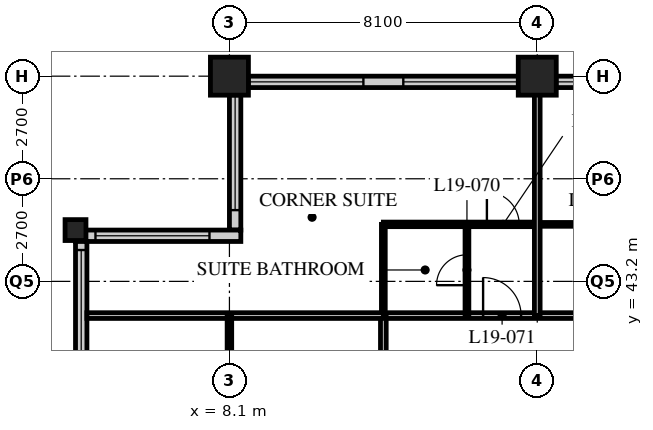
"""IFC4 building model, lengths in metres.
Left out: names, types, materials, properties, quantities, classifications, styles, units other than length and angle.
Written with IfcOpenShell. Run it as: python <this file> out.ifc"""

import sys

from ifc_helpers import new_model, si_unit, direction, frame, frame_2d, origin, origin_2d, place, context, subcontext, project, spatial, rectangle, hollow_rectangle, extrude, element, fill, save


model = new_model("IFC4")
c1 = context("Model", 3, precision=1e-05, world=origin(), true_north=direction((0.0, 1.0)))
c2 = subcontext(c1, "Body", "Model", "MODEL_VIEW")
j1 = project(units=[si_unit("LENGTHUNIT", "METRE"), si_unit("PLANEANGLEUNIT", "RADIAN")], contexts=[c1])
p1 = place(None, origin())
s1 = spatial("IfcSite", under=j1, at=p1, CompositionType="ELEMENT")
p2 = place(p1, origin())
s2 = spatial("IfcBuilding", under=s1, at=p2, CompositionType="ELEMENT")
p3 = place(p2, frame((0.0, 0.0, 77.2)))
s3 = spatial("IfcBuildingStorey", under=s2, at=p3, CompositionType="ELEMENT", Elevation=77.2)
p4 = place(p3, frame((4.05, 44.55, 0.0), z_axis=(0.0, 0.0, 1.0), x_axis=(1.0, 0.0, 0.0)))
e1 = element("IfcColumn", 1, at=p4, inside=s3, PredefinedType="COLUMN", context=c2, shape_type="SweptSolid", body=[
    extrude(hollow_rectangle(XDim=0.55, YDim=0.55, WallThickness=0.05, at=origin_2d()), origin(), (0.0, 0.0, 1.0), 3.4),
])
for number, where, z_axis, x_axis in (
    (2, (8.1, 48.6, 0.0), (0.0, 0.0, 1.0), (1.0, 0.0, 0.0)),
    (3, (16.2, 48.6, 0.0), (0.0, 0.0, 1.0), (1.0, 0.0, 0.0)),
):
    element("IfcColumn", number, at=place(p3, frame(where, z_axis=z_axis, x_axis=x_axis)), inside=s3, PredefinedType="COLUMN", context=c2, shape_type="SweptSolid", body=[
        extrude(hollow_rectangle(XDim=1.0, YDim=1.0, WallThickness=0.1, at=origin_2d()), origin(), (0.0, 0.0, 1.0), 3.4),
    ])
p5 = place(p3, frame((48.3, 48.45, 0.0), z_axis=(0.0, 0.0, 1.0), x_axis=(-1.0, 0.0, 0.0)))
e4 = element("IfcWall", 4, at=p5, inside=s3, PredefinedType="SOLIDWALL", context=c2, shape_type="SweptSolid", body=[
    extrude(rectangle(XDim=40.2, YDim=0.3, at=frame_2d((20.1, 0.0))), origin(), (0.0, 0.0, 1.0), 3.19),
])
p6 = place(p5, frame((0.225, 0.0, 0.9)))
e5 = element("IfcOpeningElement", 5, at=p6, cuts=e4, PredefinedType="OPENING", context=c2, shape_type="SweptSolid", body=[
    extrude(rectangle(XDim=3.0, YDim=1.5, at=frame_2d((1.5, 0.75))), frame((0.0, 0.16, 0.0), z_axis=(0.0, -1.0, 0.0), x_axis=(1.0, 0.0, 0.0)), (0.0, 0.0, 1.0), 0.32),
])
p7 = place(p5, frame((4.275, 0.0, 0.9)))
e6 = element("IfcOpeningElement", 6, at=p7, cuts=e4, PredefinedType="OPENING", context=c2, shape_type="SweptSolid", body=[
    extrude(rectangle(XDim=3.0, YDim=1.5, at=frame_2d((1.5, 0.75))), frame((0.0, 0.16, 0.0), z_axis=(0.0, -1.0, 0.0), x_axis=(1.0, 0.0, 0.0)), (0.0, 0.0, 1.0), 0.32),
])
p8 = place(p5, frame((8.325, 0.0, 0.9)))
e7 = element("IfcOpeningElement", 7, at=p8, cuts=e4, PredefinedType="OPENING", context=c2, shape_type="SweptSolid", body=[
    extrude(rectangle(XDim=3.0, YDim=1.5, at=frame_2d((1.5, 0.75))), frame((0.0, 0.16, 0.0), z_axis=(0.0, -1.0, 0.0), x_axis=(1.0, 0.0, 0.0)), (0.0, 0.0, 1.0), 0.32),
])
p9 = place(p5, frame((12.375, 0.0, 0.9)))
e8 = element("IfcOpeningElement", 8, at=p9, cuts=e4, PredefinedType="OPENING", context=c2, shape_type="SweptSolid", body=[
    extrude(rectangle(XDim=3.0, YDim=1.5, at=frame_2d((1.5, 0.75))), frame((0.0, 0.16, 0.0), z_axis=(0.0, -1.0, 0.0), x_axis=(1.0, 0.0, 0.0)), (0.0, 0.0, 1.0), 0.32),
])
p10 = place(p5, frame((16.425, 0.0, 0.9)))
e9 = element("IfcOpeningElement", 9, at=p10, cuts=e4, PredefinedType="OPENING", context=c2, shape_type="SweptSolid", body=[
    extrude(rectangle(XDim=3.0, YDim=1.5, at=frame_2d((1.5, 0.75))), frame((0.0, 0.16, 0.0), z_axis=(0.0, -1.0, 0.0), x_axis=(1.0, 0.0, 0.0)), (0.0, 0.0, 1.0), 0.32),
])
p11 = place(p5, frame((20.475, 0.0, 0.9)))
e10 = element("IfcOpeningElement", 10, at=p11, cuts=e4, PredefinedType="OPENING", context=c2, shape_type="SweptSolid", body=[
    extrude(rectangle(XDim=3.0, YDim=1.5, at=frame_2d((1.5, 0.75))), frame((0.0, 0.16, 0.0), z_axis=(0.0, -1.0, 0.0), x_axis=(1.0, 0.0, 0.0)), (0.0, 0.0, 1.0), 0.32),
])
p12 = place(p5, frame((24.525, 0.0, 0.9)))
e11 = element("IfcOpeningElement", 11, at=p12, cuts=e4, PredefinedType="OPENING", context=c2, shape_type="SweptSolid", body=[
    extrude(rectangle(XDim=3.0, YDim=1.5, at=frame_2d((1.5, 0.75))), frame((0.0, 0.16, 0.0), z_axis=(0.0, -1.0, 0.0), x_axis=(1.0, 0.0, 0.0)), (0.0, 0.0, 1.0), 0.32),
])
p13 = place(p5, frame((28.575, 0.0, 0.9)))
e12 = element("IfcOpeningElement", 12, at=p13, cuts=e4, PredefinedType="OPENING", context=c2, shape_type="SweptSolid", body=[
    extrude(rectangle(XDim=3.0, YDim=1.5, at=frame_2d((1.5, 0.75))), frame((0.0, 0.16, 0.0), z_axis=(0.0, -1.0, 0.0), x_axis=(1.0, 0.0, 0.0)), (0.0, 0.0, 1.0), 0.32),
])
p14 = place(p5, frame((32.625, 0.0, 0.9)))
e13 = element("IfcOpeningElement", 13, at=p14, cuts=e4, PredefinedType="OPENING", context=c2, shape_type="SweptSolid", body=[
    extrude(rectangle(XDim=3.0, YDim=1.5, at=frame_2d((1.5, 0.75))), frame((0.0, 0.16, 0.0), z_axis=(0.0, -1.0, 0.0), x_axis=(1.0, 0.0, 0.0)), (0.0, 0.0, 1.0), 0.32),
])
p15 = place(p5, frame((36.675, 0.0, 0.9)))
e14 = element("IfcOpeningElement", 14, at=p15, cuts=e4, PredefinedType="OPENING", context=c2, shape_type="SweptSolid", body=[
    extrude(rectangle(XDim=3.0, YDim=1.5, at=frame_2d((1.5, 0.75))), frame((0.0, 0.16, 0.0), z_axis=(0.0, -1.0, 0.0), x_axis=(1.0, 0.0, 0.0)), (0.0, 0.0, 1.0), 0.32),
])
p16 = place(p3, frame((8.25, 48.3, 0.0), z_axis=(0.0, 0.0, 1.0), x_axis=(0.0, -1.0, 0.0)))
e15 = element("IfcWall", 15, at=p16, inside=s3, PredefinedType="SOLIDWALL", context=c2, shape_type="SweptSolid", body=[
    extrude(rectangle(XDim=3.75, YDim=0.3, at=frame_2d((1.875, 0.0))), origin(), (0.0, 0.0, 1.0), 3.19),
])
p17 = place(p16, frame((0.225, 0.0, 0.9)))
e16 = element("IfcOpeningElement", 16, at=p17, cuts=e15, PredefinedType="OPENING", context=c2, shape_type="SweptSolid", body=[
    extrude(rectangle(XDim=3.0, YDim=1.5, at=frame_2d((1.5, 0.75))), frame((0.0, 0.16, 0.0), z_axis=(0.0, -1.0, 0.0), x_axis=(1.0, 0.0, 0.0)), (0.0, 0.0, 1.0), 0.32),
])
p18 = place(p3, frame((8.4, 44.4, 0.0), z_axis=(0.0, 0.0, 1.0), x_axis=(-1.0, 0.0, 0.0)))
e17 = element("IfcWall", 17, at=p18, inside=s3, PredefinedType="SOLIDWALL", context=c2, shape_type="SweptSolid", body=[
    extrude(rectangle(XDim=4.35, YDim=0.3, at=frame_2d((2.175, 0.0))), origin(), (0.0, 0.0, 1.0), 3.19),
])
p19 = place(p18, frame((0.825, 0.0, 0.9)))
e18 = element("IfcOpeningElement", 18, at=p19, cuts=e17, PredefinedType="OPENING", context=c2, shape_type="SweptSolid", body=[
    extrude(rectangle(XDim=3.0, YDim=1.5, at=frame_2d((1.5, 0.75))), frame((0.0, 0.16, 0.0), z_axis=(0.0, -1.0, 0.0), x_axis=(1.0, 0.0, 0.0)), (0.0, 0.0, 1.0), 0.32),
])
p20 = place(p3, frame((4.2, 44.25, 0.0), z_axis=(0.0, 0.0, 1.0), x_axis=(0.0, -1.0, 0.0)))
e19 = element("IfcWall", 19, at=p20, inside=s3, PredefinedType="SOLIDWALL", context=c2, shape_type="SweptSolid", body=[
    extrude(rectangle(XDim=3.75, YDim=0.3, at=frame_2d((1.875, 0.0))), origin(), (0.0, 0.0, 1.0), 3.19),
])
p21 = place(p20, frame((0.225, 0.0, 0.9)))
e20 = element("IfcOpeningElement", 20, at=p21, cuts=e19, PredefinedType="OPENING", context=c2, shape_type="SweptSolid", body=[
    extrude(rectangle(XDim=3.0, YDim=1.5, at=frame_2d((1.5, 0.75))), frame((0.0, 0.16, 0.0), z_axis=(0.0, -1.0, 0.0), x_axis=(1.0, 0.0, 0.0)), (0.0, 0.0, 1.0), 0.32),
])
p22 = place(p3, frame((12.15, 42.3, 0.0), z_axis=(0.0, 0.0, 1.0), x_axis=(1.0, 0.0, 0.0)))
e21 = element("IfcWall", 21, at=p22, inside=s3, PredefinedType="PARTITIONING", context=c2, shape_type="SweptSolid", body=[
    extrude(rectangle(XDim=36.45, YDim=0.15, at=frame_2d((18.225, 0.0))), origin(), (0.0, 0.0, 1.0), 3.19),
])
p23 = place(p22, frame((9.5, 0.0, 0.0)))
e22 = element("IfcOpeningElement", 22, at=p23, cuts=e21, PredefinedType="OPENING", context=c2, shape_type="SweptSolid", body=[
    extrude(rectangle(XDim=1.0, YDim=2.1, at=frame_2d((0.5, 1.05))), frame((0.0, 0.085, 0.0), z_axis=(0.0, -1.0, 0.0), x_axis=(1.0, 0.0, 0.0)), (0.0, 0.0, 1.0), 0.17),
])
p24 = place(p22, frame((17.6, 0.0, 0.0)))
e23 = element("IfcOpeningElement", 23, at=p24, cuts=e21, PredefinedType="OPENING", context=c2, shape_type="SweptSolid", body=[
    extrude(rectangle(XDim=1.0, YDim=2.1, at=frame_2d((0.5, 1.05))), frame((0.0, 0.085, 0.0), z_axis=(0.0, -1.0, 0.0), x_axis=(1.0, 0.0, 0.0)), (0.0, 0.0, 1.0), 0.17),
])
p25 = place(p22, frame((22.7, 0.0, 0.0)))
e24 = element("IfcOpeningElement", 24, at=p25, cuts=e21, PredefinedType="OPENING", context=c2, shape_type="SweptSolid", body=[
    extrude(rectangle(XDim=1.0, YDim=2.1, at=frame_2d((0.5, 1.05))), frame((0.0, 0.085, 0.0), z_axis=(0.0, -1.0, 0.0), x_axis=(1.0, 0.0, 0.0)), (0.0, 0.0, 1.0), 0.17),
])
p26 = place(p22, frame((26.75, 0.0, 0.0)))
e25 = element("IfcOpeningElement", 25, at=p26, cuts=e21, PredefinedType="OPENING", context=c2, shape_type="SweptSolid", body=[
    extrude(rectangle(XDim=1.0, YDim=2.1, at=frame_2d((0.5, 1.05))), frame((0.0, 0.085, 0.0), z_axis=(0.0, -1.0, 0.0), x_axis=(1.0, 0.0, 0.0)), (0.0, 0.0, 1.0), 0.17),
])
p27 = place(p22, frame((30.8, 0.0, 0.0)))
e26 = element("IfcOpeningElement", 26, at=p27, cuts=e21, PredefinedType="OPENING", context=c2, shape_type="SweptSolid", body=[
    extrude(rectangle(XDim=1.0, YDim=2.1, at=frame_2d((0.5, 1.05))), frame((0.0, 0.085, 0.0), z_axis=(0.0, -1.0, 0.0), x_axis=(1.0, 0.0, 0.0)), (0.0, 0.0, 1.0), 0.17),
])
p28 = place(p22, frame((32.825, 0.0, 0.0)))
e27 = element("IfcOpeningElement", 27, at=p28, cuts=e21, PredefinedType="OPENING", context=c2, shape_type="SweptSolid", body=[
    extrude(rectangle(XDim=1.0, YDim=2.1, at=frame_2d((0.5, 1.05))), frame((0.0, 0.085, 0.0), z_axis=(0.0, -1.0, 0.0), x_axis=(1.0, 0.0, 0.0)), (0.0, 0.0, 1.0), 0.17),
])
p29 = place(p22, frame((2.625, 0.0, 0.0)))
e28 = element("IfcOpeningElement", 28, at=p29, cuts=e21, PredefinedType="OPENING", context=c2, shape_type="SweptSolid", body=[
    extrude(rectangle(XDim=1.0, YDim=2.1, at=frame_2d((0.5, 1.05))), frame((0.0, 0.085, 0.0), z_axis=(0.0, -1.0, 0.0), x_axis=(1.0, 0.0, 0.0)), (0.0, 0.0, 1.0), 0.17),
])
p30 = place(p3, frame((12.15, 16.2, 0.0), z_axis=(0.0, 0.0, 1.0), x_axis=(0.0, 1.0, 0.0)))
e29 = element("IfcWall", 29, at=p30, inside=s3, PredefinedType="PARTITIONING", context=c2, shape_type="SweptSolid", body=[
    extrude(rectangle(XDim=26.1, YDim=0.15, at=frame_2d((13.05, 0.0))), origin(), (0.0, 0.0, 1.0), 3.19),
])
p31 = place(p30, frame((0.3, 0.0, 0.0)))
e30 = element("IfcOpeningElement", 30, at=p31, cuts=e29, PredefinedType="OPENING", context=c2, shape_type="SweptSolid", body=[
    extrude(rectangle(XDim=1.0, YDim=2.1, at=frame_2d((0.5, 1.05))), frame((0.0, 0.085, 0.0), z_axis=(0.0, -1.0, 0.0), x_axis=(1.0, 0.0, 0.0)), (0.0, 0.0, 1.0), 0.17),
])
p32 = place(p30, frame((6.5, 0.0, 0.0)))
e31 = element("IfcOpeningElement", 31, at=p32, cuts=e29, PredefinedType="OPENING", context=c2, shape_type="SweptSolid", body=[
    extrude(rectangle(XDim=1.0, YDim=2.1, at=frame_2d((0.5, 1.05))), frame((0.0, 0.085, 0.0), z_axis=(0.0, -1.0, 0.0), x_axis=(1.0, 0.0, 0.0)), (0.0, 0.0, 1.0), 0.17),
])
p33 = place(p30, frame((13.55, 0.0, 0.0)))
e32 = element("IfcOpeningElement", 32, at=p33, cuts=e29, PredefinedType="OPENING", context=c2, shape_type="SweptSolid", body=[
    extrude(rectangle(XDim=1.0, YDim=2.1, at=frame_2d((0.5, 1.05))), frame((0.0, 0.085, 0.0), z_axis=(0.0, -1.0, 0.0), x_axis=(1.0, 0.0, 0.0)), (0.0, 0.0, 1.0), 0.17),
])
p34 = place(p30, frame((21.65, 0.0, 0.0)))
e33 = element("IfcOpeningElement", 33, at=p34, cuts=e29, PredefinedType="OPENING", context=c2, shape_type="SweptSolid", body=[
    extrude(rectangle(XDim=1.0, YDim=2.1, at=frame_2d((0.5, 1.05))), frame((0.0, 0.085, 0.0), z_axis=(0.0, -1.0, 0.0), x_axis=(1.0, 0.0, 0.0)), (0.0, 0.0, 1.0), 0.17),
])
p35 = place(p3, frame((16.2, 44.7, 0.0), z_axis=(0.0, 0.0, 1.0), x_axis=(1.0, 0.0, 0.0)))
e34 = element("IfcWall", 34, at=p35, inside=s3, PredefinedType="PARTITIONING", context=c2, shape_type="SweptSolid", body=[
    extrude(rectangle(XDim=5.2, YDim=0.1, at=frame_2d((2.6, 0.0))), origin(), (0.0, 0.0, 1.0), 3.19),
])
p36 = place(p35, frame((1.3, 0.0, 0.0)))
e35 = element("IfcOpeningElement", 35, at=p36, cuts=e34, PredefinedType="OPENING", context=c2, shape_type="SweptSolid", body=[
    extrude(rectangle(XDim=0.8, YDim=2.1, at=frame_2d((0.4, 1.05))), frame((0.0, 0.06, 0.0), z_axis=(0.0, -1.0, 0.0), x_axis=(1.0, 0.0, 0.0)), (0.0, 0.0, 1.0), 0.12),
])
p37 = place(p35, frame((3.9, 0.0, 0.0)))
e36 = element("IfcOpeningElement", 36, at=p37, cuts=e34, PredefinedType="OPENING", context=c2, shape_type="SweptSolid", body=[
    extrude(rectangle(XDim=0.8, YDim=2.1, at=frame_2d((0.4, 1.05))), frame((0.0, 0.06, 0.0), z_axis=(0.0, -1.0, 0.0), x_axis=(1.0, 0.0, 0.0)), (0.0, 0.0, 1.0), 0.12),
])
p38 = place(p3, frame((12.15, 44.7, 0.0), z_axis=(0.0, 0.0, 1.0), x_axis=(1.0, 0.0, 0.0)))
e37 = element("IfcWall", 37, at=p38, inside=s3, PredefinedType="PARTITIONING", context=c2, shape_type="SweptSolid", body=[
    extrude(rectangle(XDim=4.05, YDim=0.12, at=frame_2d((2.025, 0.0))), origin(), (0.0, 0.0, 1.0), 3.19),
])
p39 = place(p38, frame((2.725, 0.0, 0.0)))
e38 = element("IfcOpeningElement", 38, at=p39, cuts=e37, PredefinedType="OPENING", context=c2, shape_type="SweptSolid", body=[
    extrude(rectangle(XDim=0.85, YDim=2.1, at=frame_2d((0.425, 1.05))), frame((0.0, 0.07, 0.0), z_axis=(0.0, -1.0, 0.0), x_axis=(1.0, 0.0, 0.0)), (0.0, 0.0, 1.0), 0.14),
])
p40 = place(p3, frame((14.35, 42.3, 0.0), z_axis=(0.0, 0.0, 1.0), x_axis=(0.0, 1.0, 0.0)))
e39 = element("IfcWall", 39, at=p40, inside=s3, PredefinedType="PARTITIONING", context=c2, shape_type="SweptSolid", body=[
    extrude(rectangle(XDim=2.4, YDim=0.1, at=frame_2d((1.2, 0.0))), origin(), (0.0, 0.0, 1.0), 3.19),
])
p41 = place(p40, frame((0.8, 0.0, 0.0)))
e40 = element("IfcOpeningElement", 40, at=p41, cuts=e39, PredefinedType="OPENING", context=c2, shape_type="SweptSolid", body=[
    extrude(rectangle(XDim=0.8, YDim=2.1, at=frame_2d((0.4, 1.05))), frame((0.0, 0.06, 0.0), z_axis=(0.0, -1.0, 0.0), x_axis=(1.0, 0.0, 0.0)), (0.0, 0.0, 1.0), 0.12),
])
p42 = place(p3, frame((12.15, 42.3, 0.0), z_axis=(0.0, 0.0, 1.0), x_axis=(0.0, 1.0, 0.0)))
e41 = element("IfcWall", 41, at=p42, inside=s3, PredefinedType="PARTITIONING", context=c2, shape_type="SweptSolid", body=[
    extrude(rectangle(XDim=2.4, YDim=0.1, at=frame_2d((1.2, 0.0))), origin(), (0.0, 0.0, 1.0), 3.19),
])
p43 = place(p3, frame((4.35, 42.3, 0.0), z_axis=(0.0, 0.0, 1.0), x_axis=(1.0, 0.0, 0.0)))
e42 = element("IfcWall", 42, at=p43, inside=s3, PredefinedType="PARTITIONING", context=c2, shape_type="SweptSolid", body=[
    extrude(rectangle(XDim=7.8, YDim=0.15, at=frame_2d((3.9, 0.0))), origin(), (0.0, 0.0, 1.0), 3.19),
])
p44 = place(p3, frame((16.2, 42.3, 0.0), z_axis=(0.0, 0.0, 1.0), x_axis=(0.0, 1.0, 0.0)))
e43 = element("IfcWall", 43, at=p44, inside=s3, PredefinedType="PARTITIONING", context=c2, shape_type="SweptSolid", body=[
    extrude(rectangle(XDim=6.0, YDim=0.15, at=frame_2d((3.0, 0.0))), origin(), (0.0, 0.0, 1.0), 2.428),
])
p45 = place(p3, frame((8.1, 42.3, 0.0), z_axis=(0.0, 0.0, 1.0), x_axis=(0.0, -1.0, 0.0)))
e44 = element("IfcWall", 44, at=p45, inside=s3, PredefinedType="PARTITIONING", context=c2, shape_type="SweptSolid", body=[
    extrude(rectangle(XDim=1.35, YDim=0.12, at=frame_2d((0.675, 0.0))), origin(), (0.0, 0.0, 1.0), 2.428),
])
p46 = place(p13, origin())
e45 = element("IfcWindow", 45, at=p46, inside=s3, PartitioningType="SINGLE_PANEL", PredefinedType="WINDOW", context=c2, shape_type="SweptSolid", body=[
    extrude(rectangle(XDim=3.0, YDim=1.5, at=frame_2d((1.5, 0.75))), frame((0.0, 0.03, 0.0), z_axis=(0.0, -1.0, 0.0), x_axis=(1.0, 0.0, 0.0)), (0.0, 0.0, 1.0), 0.06),
])
fill(e12, e45)
p47 = place(p14, origin())
e46 = element("IfcWindow", 46, at=p47, inside=s3, PartitioningType="SINGLE_PANEL", PredefinedType="WINDOW", context=c2, shape_type="SweptSolid", body=[
    extrude(rectangle(XDim=3.0, YDim=1.5, at=frame_2d((1.5, 0.75))), frame((0.0, 0.03, 0.0), z_axis=(0.0, -1.0, 0.0), x_axis=(1.0, 0.0, 0.0)), (0.0, 0.0, 1.0), 0.06),
])
fill(e13, e46)
p48 = place(p15, origin())
e47 = element("IfcWindow", 47, at=p48, inside=s3, PartitioningType="SINGLE_PANEL", PredefinedType="WINDOW", context=c2, shape_type="SweptSolid", body=[
    extrude(rectangle(XDim=3.0, YDim=1.5, at=frame_2d((1.5, 0.75))), frame((0.0, 0.03, 0.0), z_axis=(0.0, -1.0, 0.0), x_axis=(1.0, 0.0, 0.0)), (0.0, 0.0, 1.0), 0.06),
])
fill(e14, e47)
p49 = place(p17, origin())
e48 = element("IfcWindow", 48, at=p49, inside=s3, PartitioningType="SINGLE_PANEL", PredefinedType="WINDOW", context=c2, shape_type="SweptSolid", body=[
    extrude(rectangle(XDim=3.0, YDim=1.5, at=frame_2d((1.5, 0.75))), frame((0.0, 0.03, 0.0), z_axis=(0.0, -1.0, 0.0), x_axis=(1.0, 0.0, 0.0)), (0.0, 0.0, 1.0), 0.06),
])
fill(e16, e48)
p50 = place(p19, origin())
e49 = element("IfcWindow", 49, at=p50, inside=s3, PartitioningType="SINGLE_PANEL", PredefinedType="WINDOW", context=c2, shape_type="SweptSolid", body=[
    extrude(rectangle(XDim=3.0, YDim=1.5, at=frame_2d((1.5, 0.75))), frame((0.0, 0.03, 0.0), z_axis=(0.0, -1.0, 0.0), x_axis=(1.0, 0.0, 0.0)), (0.0, 0.0, 1.0), 0.06),
])
fill(e18, e49)
p51 = place(p21, origin())
e50 = element("IfcWindow", 50, at=p51, inside=s3, PartitioningType="SINGLE_PANEL", PredefinedType="WINDOW", context=c2, shape_type="SweptSolid", body=[
    extrude(rectangle(XDim=3.0, YDim=1.5, at=frame_2d((1.5, 0.75))), frame((0.0, 0.03, 0.0), z_axis=(0.0, -1.0, 0.0), x_axis=(1.0, 0.0, 0.0)), (0.0, 0.0, 1.0), 0.06),
])
fill(e20, e50)
p52 = place(p41, origin())
e51 = element("IfcDoor", 51, at=p52, inside=s3, OperationType="SINGLE_SWING_LEFT", PredefinedType="DOOR", context=c2, shape_type="SweptSolid", body=[
    extrude(rectangle(XDim=0.8, YDim=2.1, at=frame_2d((0.4, 1.05))), frame((0.0, 0.025, 0.0), z_axis=(0.0, -1.0, 0.0), x_axis=(1.0, 0.0, 0.0)), (0.0, 0.0, 1.0), 0.05),
])
fill(e40, e51)
p53 = place(p29, origin())
e52 = element("IfcDoor", 52, at=p53, inside=s3, OperationType="SINGLE_SWING_LEFT", PredefinedType="DOOR", context=c2, shape_type="SweptSolid", body=[
    extrude(rectangle(XDim=1.0, YDim=2.1, at=frame_2d((0.5, 1.05))), frame((0.0, 0.025, 0.0), z_axis=(0.0, -1.0, 0.0), x_axis=(1.0, 0.0, 0.0)), (0.0, 0.0, 1.0), 0.05),
])
fill(e28, e52)
p54 = place(p39, origin())
e53 = element("IfcDoor", 53, at=p54, inside=s3, OperationType="SINGLE_SWING_LEFT", PredefinedType="DOOR", context=c2, shape_type="SweptSolid", body=[
    extrude(rectangle(XDim=0.85, YDim=2.1, at=frame_2d((0.425, 1.05))), frame((0.0, 0.025, 0.0), z_axis=(0.0, -1.0, 0.0), x_axis=(1.0, 0.0, 0.0)), (0.0, 0.0, 1.0), 0.05),
])
fill(e38, e53)
save(model, sys.argv[1])
